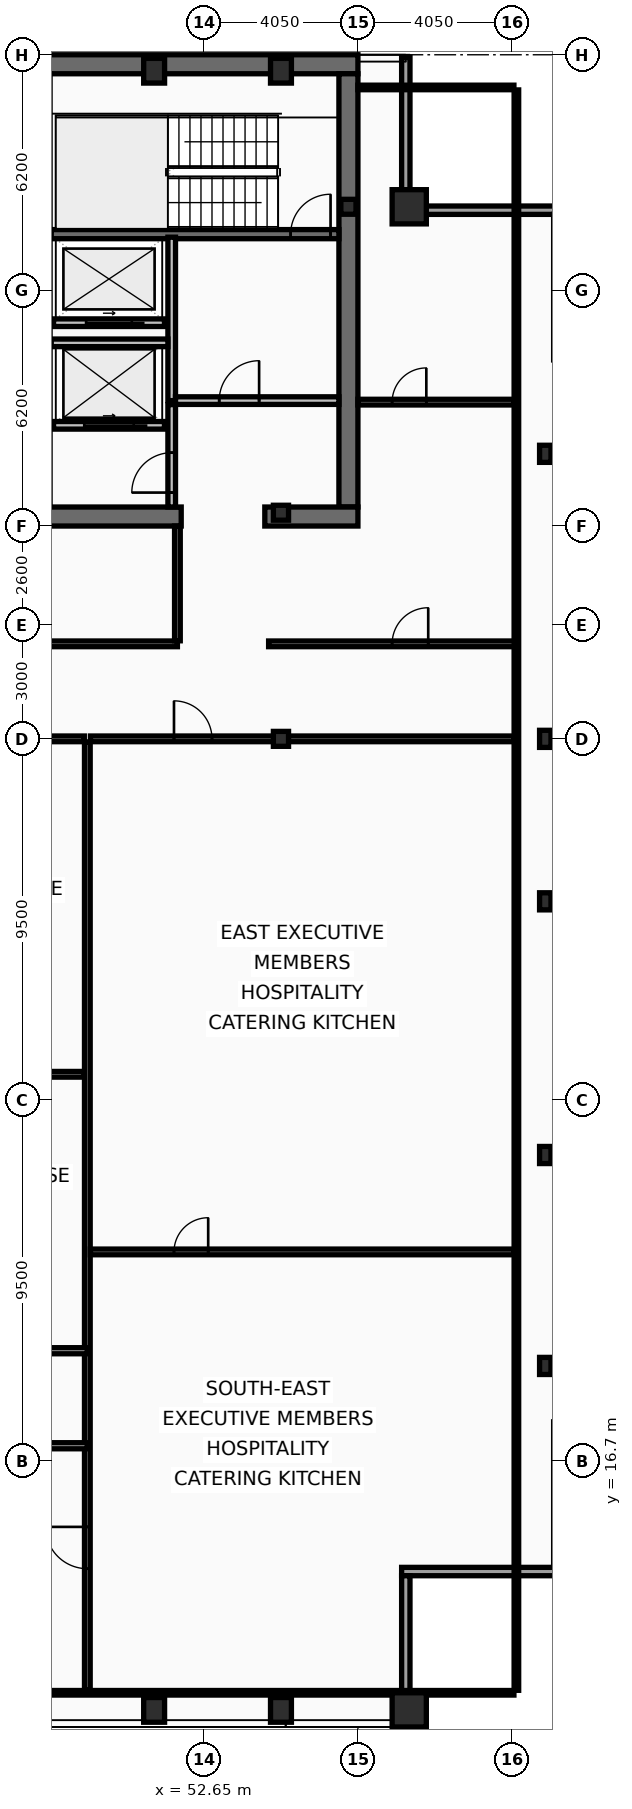
"""IFC4 building model, lengths in metres.
Left out: names, types, materials, properties, quantities, classifications, styles, units other than length and angle.
Written with IfcOpenShell. Run it as: python <this file> out.ifc"""

import sys

from ifc_helpers import new_model, si_unit, direction, frame, frame_2d, origin, origin_2d, place, context, subcontext, project, spatial, rectangle, hollow_rectangle, i_section, extrude, element, fill, save


model = new_model("IFC4")
c1 = context("Model", 3, precision=1e-05, world=origin(), true_north=direction((0.0, 1.0)))
c2 = subcontext(c1, "Body", "Model", "MODEL_VIEW")
j1 = project(units=[si_unit("LENGTHUNIT", "METRE"), si_unit("PLANEANGLEUNIT", "RADIAN")], contexts=[c1])
p1 = place(None, origin())
s1 = spatial("IfcSite", under=j1, at=p1, CompositionType="ELEMENT")
p2 = place(p1, origin())
s2 = spatial("IfcBuilding", under=s1, at=p2, CompositionType="ELEMENT")
p3 = place(p2, frame((0.0, 0.0, 318.2)))
s3 = spatial("IfcBuildingStorey", under=s2, at=p3, CompositionType="ELEMENT", Elevation=318.2)
p4 = place(p3, frame((16.2, 53.45, 0.0), z_axis=(0.0, 0.0, 1.0), x_axis=(1.0, 0.0, 0.0)))
e1 = element("IfcWall", 1, at=p4, inside=s3, PredefinedType="SHEAR", context=c2, shape_type="SweptSolid", body=[
    extrude(rectangle(XDim=40.5, YDim=0.5, at=frame_2d((20.25, 0.0))), origin(), (0.0, 0.0, 1.0), 3.44),
])
p5 = place(p3, frame((56.45, 53.2, 0.0), z_axis=(0.0, 0.0, 1.0), x_axis=(0.0, -1.0, 0.0)))
e2 = element("IfcWall", 2, at=p5, inside=s3, PredefinedType="SHEAR", context=c2, shape_type="SweptSolid", body=[
    extrude(rectangle(XDim=11.4, YDim=0.5, at=frame_2d((5.7, 0.0))), origin(), (0.0, 0.0, 1.0), 3.44),
])
p6 = place(p3, frame((52.05, 41.55, 0.0), z_axis=(0.0, 0.0, 1.0), x_axis=(-1.0, 0.0, 0.0)))
e3 = element("IfcWall", 3, at=p6, inside=s3, PredefinedType="SHEAR", context=c2, shape_type="SweptSolid", body=[
    extrude(rectangle(XDim=11.3, YDim=0.5, at=frame_2d((5.65, 0.0))), origin(), (0.0, 0.0, 1.0), 3.44),
])
p7 = place(p3, frame((56.7, 41.55, 0.0), z_axis=(0.0, 0.0, 1.0), x_axis=(-1.0, 0.0, 0.0)))
e4 = element("IfcWall", 4, at=p7, inside=s3, PredefinedType="SHEAR", context=c2, shape_type="SweptSolid", body=[
    extrude(rectangle(XDim=2.45, YDim=0.5, at=frame_2d((1.225, 0.0))), origin(), (0.0, 0.0, 1.0), 3.44),
])
p8 = place(p3, frame((48.63, 48.98, 0.0), z_axis=(0.0, 0.0, 1.0), x_axis=(1.0, 0.0, 0.0)))
e5 = element("IfcWall", 5, at=p8, inside=s3, PredefinedType="SHEAR", context=c2, shape_type="SweptSolid", body=[
    extrude(rectangle(XDim=7.57, YDim=0.24, at=frame_2d((3.785, 0.0))), origin(), (0.0, 0.0, 1.0), 3.44),
])
p9 = place(p8, frame((6.3, 0.0, 0.0)))
e6 = element("IfcOpeningElement", 6, at=p9, cuts=e5, PredefinedType="OPENING", context=c2, shape_type="SweptSolid", body=[
    extrude(rectangle(XDim=1.05, YDim=2.15, at=frame_2d((0.525, 1.075))), frame((0.0, 0.13, 0.0), z_axis=(0.0, -1.0, 0.0), x_axis=(1.0, 0.0, 0.0)), (0.0, 0.0, 1.0), 0.26),
])
for number, where, z_axis, x_axis in (
    (7, (58.05, 10.15, 0.0), (0.0, 0.0, 1.0), (1.0, 0.0, 0.0)),
    (8, (58.05, 49.7, 0.0), (0.0, 0.0, 1.0), (1.0, 0.0, 0.0)),
):
    element("IfcColumn", number, at=place(p3, frame(where, z_axis=z_axis, x_axis=x_axis)), inside=s3, PredefinedType="COLUMN", context=c2, shape_type="SweptSolid", body=[
        extrude(hollow_rectangle(XDim=0.9, YDim=0.9, WallThickness=0.05, at=origin_2d()), origin(), (0.0, 0.0, 1.0), 3.6),
    ])
for number, where, z_axis, x_axis in (
    (9, (51.337, 10.15, 0.0), (0.0, 0.0, 1.0), (1.0, 0.0, 0.0)),
    (10, (54.675, 10.15, 0.0), (0.0, 0.0, 1.0), (1.0, 0.0, 0.0)),
    (11, (51.337, 53.28, 0.0), (0.0, 0.0, 1.0), (1.0, 0.0, 0.0)),
    (12, (54.675, 53.28, 0.0), (0.0, 0.0, 1.0), (1.0, 0.0, 0.0)),
):
    element("IfcColumn", number, at=place(p3, frame(where, z_axis=z_axis, x_axis=x_axis)), inside=s3, PredefinedType="COLUMN", context=c2, shape_type="SweptSolid", body=[
        extrude(hollow_rectangle(XDim=0.55, YDim=0.65, WallThickness=0.04, at=origin_2d()), origin(), (0.0, 0.0, 1.0), 3.6),
    ])
for number, where, z_axis, x_axis in (
    (13, (61.63, 19.2, 0.0), (0.0, 0.0, 1.0), (1.0, 0.0, 0.0)),
    (14, (61.63, 24.75, 0.0), (0.0, 0.0, 1.0), (1.0, 0.0, 0.0)),
    (15, (61.63, 31.425, 0.0), (0.0, 0.0, 1.0), (1.0, 0.0, 0.0)),
    (16, (61.63, 35.7, 0.0), (0.0, 0.0, 1.0), (1.0, 0.0, 0.0)),
    (17, (61.63, 43.2, 0.0), (0.0, 0.0, 1.0), (1.0, 0.0, 0.0)),
):
    element("IfcColumn", number, at=place(p3, frame(where, z_axis=z_axis, x_axis=x_axis)), inside=s3, PredefinedType="COLUMN", context=c2, shape_type="SweptSolid", body=[
        extrude(i_section(OverallWidth=0.3, OverallDepth=0.45, WebThickness=0.014, FlangeThickness=0.026, at=origin_2d()), origin(), (0.0, 0.0, 1.0), 3.6),
    ])
for number, where, z_axis, x_axis in (
    (18, (56.45, 49.7, 0.0), (0.0, 0.0, 1.0), (1.0, 0.0, 0.0)),
    (19, (54.675, 35.7, 0.0), (0.0, 0.0, 1.0), (1.0, 0.0, 0.0)),
    (20, (54.675, 41.65, 0.0), (0.0, 0.0, 1.0), (1.0, 0.0, 0.0)),
):
    element("IfcColumn", number, at=place(p3, frame(where, z_axis=z_axis, x_axis=x_axis)), inside=s3, PredefinedType="COLUMN", context=c2, shape_type="SweptSolid", body=[
        extrude(i_section(OverallWidth=0.399, OverallDepth=0.393, WebThickness=0.023, FlangeThickness=0.037, at=origin_2d()), origin(), (0.0, 0.0, 1.0), 3.6),
    ])
p10 = place(p3, frame((57.96, 53.63, 0.0), z_axis=(0.0, 0.0, 1.0), x_axis=(0.0, -1.0, 0.0)))
e21 = element("IfcWall", 21, at=p10, inside=s3, PredefinedType="SOLIDWALL", context=c2, shape_type="SweptSolid", body=[
    extrude(rectangle(XDim=3.91, YDim=0.22, at=frame_2d((1.955, 0.0))), origin(), (0.0, 0.0, 1.0), 2.88),
])
for number, where, z_axis, x_axis in (
    (22, (57.85, 49.61, 0.0), (0.0, 0.0, 1.0), (1.0, 0.0, 0.0)),
    (23, (62.07, 13.79, 0.0), (0.0, 0.0, 1.0), (-1.0, 0.0, 0.0)),
):
    element("IfcWall", number, at=place(p3, frame(where, z_axis=z_axis, x_axis=x_axis)), inside=s3, PredefinedType="SOLIDWALL", context=c2, shape_type="SweptSolid", body=[
        extrude(rectangle(XDim=4.22, YDim=0.22, at=frame_2d((2.11, 0.0))), origin(), (0.0, 0.0, 1.0), 2.88),
    ])
p11 = place(p3, frame((57.96, 13.68, 0.0), z_axis=(0.0, 0.0, 1.0), x_axis=(0.0, -1.0, 0.0)))
e24 = element("IfcWall", 24, at=p11, inside=s3, PredefinedType="SOLIDWALL", context=c2, shape_type="SweptSolid", body=[
    extrude(rectangle(XDim=3.91, YDim=0.22, at=frame_2d((1.955, 0.0))), origin(), (0.0, 0.0, 1.0), 2.88),
])
p12 = place(p3, frame((51.61, 43.95, 0.0), z_axis=(0.0, 0.0, 1.0), x_axis=(-1.0, 0.0, 0.0)))
e25 = element("IfcWall", 25, at=p12, inside=s3, PredefinedType="PARTITIONING", context=c2, shape_type="SweptSolid", body=[
    extrude(rectangle(XDim=2.92, YDim=0.2, at=frame_2d((1.46, 0.0))), origin(), (0.0, 0.0, 1.0), 3.44),
])
p13 = place(p12, frame((0.81, 0.0, 0.0)))
e26 = element("IfcOpeningElement", 26, at=p13, cuts=e25, PredefinedType="OPENING", context=c2, shape_type="SweptSolid", body=[
    extrude(rectangle(XDim=1.3, YDim=2.18, at=frame_2d((0.65, 1.09))), frame((0.0, 0.11, 0.0), z_axis=(0.0, -1.0, 0.0), x_axis=(1.0, 0.0, 0.0)), (0.0, 0.0, 1.0), 0.22),
])
p14 = place(p3, frame((51.61, 46.65, 0.0), z_axis=(0.0, 0.0, 1.0), x_axis=(-1.0, 0.0, 0.0)))
e27 = element("IfcWall", 27, at=p14, inside=s3, PredefinedType="PARTITIONING", context=c2, shape_type="SweptSolid", body=[
    extrude(rectangle(XDim=2.92, YDim=0.2, at=frame_2d((1.46, 0.0))), origin(), (0.0, 0.0, 1.0), 3.44),
])
p15 = place(p14, frame((0.86, 0.0, 0.0)))
e28 = element("IfcOpeningElement", 28, at=p15, cuts=e27, PredefinedType="OPENING", context=c2, shape_type="SweptSolid", body=[
    extrude(rectangle(XDim=1.2, YDim=2.18, at=frame_2d((0.6, 1.09))), frame((0.0, 0.11, 0.0), z_axis=(0.0, -1.0, 0.0), x_axis=(1.0, 0.0, 0.0)), (0.0, 0.0, 1.0), 0.22),
])
p16 = place(p3, frame((51.8, 44.6, 0.0), z_axis=(0.0, 0.0, 1.0), x_axis=(0.0, 1.0, 0.0)))
e29 = element("IfcWall", 29, at=p16, inside=s3, PredefinedType="PARTITIONING", context=c2, shape_type="SweptSolid", body=[
    extrude(rectangle(XDim=4.3, YDim=0.2, at=frame_2d((2.15, 0.0))), origin(), (0.0, 0.0, 1.0), 3.44),
])
p17 = place(p3, frame((51.9, 44.6, 0.0), z_axis=(0.0, 0.0, 1.0), x_axis=(1.0, 0.0, 0.0)))
e30 = element("IfcWall", 30, at=p17, inside=s3, PredefinedType="PARTITIONING", context=c2, shape_type="SweptSolid", body=[
    extrude(rectangle(XDim=4.3, YDim=0.2, at=frame_2d((2.15, 0.0))), origin(), (0.0, 0.0, 1.0), 3.44),
])
p18 = place(p17, frame((1.15, 0.0, 0.0)))
e31 = element("IfcOpeningElement", 31, at=p18, cuts=e30, PredefinedType="OPENING", context=c2, shape_type="SweptSolid", body=[
    extrude(rectangle(XDim=1.05, YDim=2.15, at=frame_2d((0.525, 1.075))), frame((0.0, 0.11, 0.0), z_axis=(0.0, -1.0, 0.0), x_axis=(1.0, 0.0, 0.0)), (0.0, 0.0, 1.0), 0.22),
])
p19 = place(p3, frame((48.63, 46.12, 0.0), z_axis=(0.0, 0.0, 1.0), x_axis=(1.0, 0.0, 0.0)))
e32 = element("IfcWall", 32, at=p19, inside=s3, PredefinedType="PARTITIONING", context=c2, shape_type="SweptSolid", body=[
    extrude(rectangle(XDim=3.07, YDim=0.2, at=frame_2d((1.535, 0.0))), origin(), (0.0, 0.0, 1.0), 3.44),
])
p20 = place(p3, frame((51.8, 41.8, 0.0), z_axis=(0.0, 0.0, 1.0), x_axis=(0.0, 1.0, 0.0)))
e33 = element("IfcWall", 33, at=p20, inside=s3, PredefinedType="PARTITIONING", context=c2, shape_type="SweptSolid", body=[
    extrude(rectangle(XDim=2.695, YDim=0.2, at=frame_2d((1.348, 0.0))), origin(), (0.0, 0.0, 1.0), 3.44),
])
p21 = place(p20, frame((0.38, 0.0, 0.0)))
e34 = element("IfcOpeningElement", 34, at=p21, cuts=e33, PredefinedType="OPENING", context=c2, shape_type="SweptSolid", body=[
    extrude(rectangle(XDim=1.05, YDim=2.15, at=frame_2d((0.525, 1.075))), frame((0.0, 0.11, 0.0), z_axis=(0.0, -1.0, 0.0), x_axis=(1.0, 0.0, 0.0)), (0.0, 0.0, 1.0), 0.22),
])
p22 = place(p3, frame((46.3, 38.2, 0.0), z_axis=(0.0, 0.0, 1.0), x_axis=(1.0, 0.0, 0.0)))
e35 = element("IfcWall", 35, at=p22, inside=s3, PredefinedType="PARTITIONING", context=c2, shape_type="SweptSolid", body=[
    extrude(rectangle(XDim=5.65, YDim=0.15, at=frame_2d((2.825, 0.0))), origin(), (0.0, 0.0, 1.0), 2.83),
])
p23 = place(p22, frame((1.1, 0.0, 0.0)))
e36 = element("IfcOpeningElement", 36, at=p23, cuts=e35, PredefinedType="OPENING", context=c2, shape_type="SweptSolid", body=[
    extrude(rectangle(XDim=1.0, YDim=2.05, at=frame_2d((0.5, 1.025))), frame((0.0, 0.085, 0.0), z_axis=(0.0, -1.0, 0.0), x_axis=(1.0, 0.0, 0.0)), (0.0, 0.0, 1.0), 0.17),
])
p24 = place(p3, frame((51.95, 38.28, 0.0), z_axis=(0.0, 0.0, 1.0), x_axis=(0.0, 1.0, 0.0)))
e37 = element("IfcWall", 37, at=p24, inside=s3, PredefinedType="PARTITIONING", context=c2, shape_type="SweptSolid", body=[
    extrude(rectangle(XDim=3.02, YDim=0.15, at=frame_2d((1.51, 0.0))), origin(), (0.0, 0.0, 1.0), 3.44),
])
p25 = place(p3, frame((54.35, 38.2, 0.0), z_axis=(0.0, 0.0, 1.0), x_axis=(1.0, 0.0, 0.0)))
e38 = element("IfcWall", 38, at=p25, inside=s3, PredefinedType="PARTITIONING", context=c2, shape_type="SweptSolid", body=[
    extrude(rectangle(XDim=6.52, YDim=0.15, at=frame_2d((3.26, 0.0))), origin(), (0.0, 0.0, 1.0), 2.83),
])
p26 = place(p25, frame((3.25, 0.0, 0.0)))
e39 = element("IfcOpeningElement", 39, at=p26, cuts=e38, PredefinedType="OPENING", context=c2, shape_type="SweptSolid", body=[
    extrude(rectangle(XDim=0.95, YDim=2.05, at=frame_2d((0.475, 1.025))), frame((0.0, 0.085, 0.0), z_axis=(0.0, -1.0, 0.0), x_axis=(1.0, 0.0, 0.0)), (0.0, 0.0, 1.0), 0.17),
])
p27 = place(p3, frame((56.7, 44.56, 0.0), z_axis=(0.0, 0.0, 1.0), x_axis=(1.0, 0.0, 0.0)))
e40 = element("IfcWall", 40, at=p27, inside=s3, PredefinedType="PARTITIONING", context=c2, shape_type="SweptSolid", body=[
    extrude(rectangle(XDim=4.105, YDim=0.15, at=frame_2d((2.052, 0.0))), origin(), (0.0, 0.0, 1.0), 2.88),
])
p28 = place(p27, frame((0.9, 0.0, 0.0)))
e41 = element("IfcOpeningElement", 41, at=p28, cuts=e40, PredefinedType="OPENING", context=c2, shape_type="SweptSolid", body=[
    extrude(rectangle(XDim=0.9, YDim=2.05, at=frame_2d((0.45, 1.025))), frame((0.0, 0.085, 0.0), z_axis=(0.0, -1.0, 0.0), x_axis=(1.0, 0.0, 0.0)), (0.0, 0.0, 1.0), 0.17),
])
p29 = place(p3, frame((49.58, 10.665, 0.0), z_axis=(0.0, 0.0, 1.0), x_axis=(0.0, 1.0, 0.0)))
e42 = element("IfcWall", 42, at=p29, inside=s3, PredefinedType="PARTITIONING", context=c2, shape_type="SweptSolid", body=[
    extrude(rectangle(XDim=24.955, YDim=0.15, at=frame_2d((12.478, 0.0))), origin(), (0.0, 0.0, 1.0), 3.07),
])
p30 = place(p29, frame((3.2, 0.0, 0.0)))
e43 = element("IfcOpeningElement", 43, at=p30, cuts=e42, PredefinedType="OPENING", context=c2, shape_type="SweptSolid", body=[
    extrude(rectangle(XDim=1.1, YDim=2.1, at=frame_2d((0.55, 1.05))), frame((0.0, 0.085, 0.0), z_axis=(0.0, -1.0, 0.0), x_axis=(1.0, 0.0, 0.0)), (0.0, 0.0, 1.0), 0.17),
])
p31 = place(p3, frame((24.48, 35.7, 0.0), z_axis=(0.0, 0.0, 1.0), x_axis=(1.0, 0.0, 0.0)))
e44 = element("IfcWall", 44, at=p31, inside=s3, PredefinedType="PARTITIONING", context=c2, shape_type="SweptSolid", body=[
    extrude(rectangle(XDim=25.02, YDim=0.15, at=frame_2d((12.51, 0.0))), origin(), (0.0, 0.0, 1.0), 2.83),
])
p32 = place(p3, frame((49.66, 35.7, 0.0), z_axis=(0.0, 0.0, 1.0), x_axis=(1.0, 0.0, 0.0)))
e45 = element("IfcWall", 45, at=p32, inside=s3, PredefinedType="PARTITIONING", context=c2, shape_type="SweptSolid", body=[
    extrude(rectangle(XDim=11.145, YDim=0.15, at=frame_2d((5.573, 0.0))), origin(), (0.0, 0.0, 1.0), 2.83),
])
p33 = place(p32, frame((2.2, 0.0, 0.0)))
e46 = element("IfcOpeningElement", 46, at=p33, cuts=e45, PredefinedType="OPENING", context=c2, shape_type="SweptSolid", body=[
    extrude(rectangle(XDim=1.0, YDim=2.05, at=frame_2d((0.5, 1.025))), frame((0.0, 0.085, 0.0), z_axis=(0.0, -1.0, 0.0), x_axis=(1.0, 0.0, 0.0)), (0.0, 0.0, 1.0), 0.17),
])
p34 = place(p3, frame((49.66, 22.2, 0.0), z_axis=(0.0, 0.0, 1.0), x_axis=(1.0, 0.0, 0.0)))
e47 = element("IfcWall", 47, at=p34, inside=s3, PredefinedType="PARTITIONING", context=c2, shape_type="SweptSolid", body=[
    extrude(rectangle(XDim=11.145, YDim=0.15, at=frame_2d((5.573, 0.0))), origin(), (0.0, 0.0, 1.0), 2.83),
])
p35 = place(p34, frame((2.2, 0.0, 0.0)))
e48 = element("IfcOpeningElement", 48, at=p35, cuts=e47, PredefinedType="OPENING", context=c2, shape_type="SweptSolid", body=[
    extrude(rectangle(XDim=0.9, YDim=2.05, at=frame_2d((0.45, 1.025))), frame((0.0, 0.085, 0.0), z_axis=(0.0, -1.0, 0.0), x_axis=(1.0, 0.0, 0.0)), (0.0, 0.0, 1.0), 0.17),
])
p36 = place(p3, frame((42.65, 19.6, 0.0), z_axis=(0.0, 0.0, 1.0), x_axis=(1.0, 0.0, 0.0)))
e49 = element("IfcWall", 49, at=p36, inside=s3, PredefinedType="PARTITIONING", context=c2, shape_type="SweptSolid", body=[
    extrude(rectangle(XDim=6.93, YDim=0.16, at=frame_2d((3.465, 0.0))), origin(), (0.0, 0.0, 1.0), 2.83),
])
p37 = place(p36, frame((3.161, 0.0, 0.0)))
e50 = element("IfcOpeningElement", 50, at=p37, cuts=e49, PredefinedType="OPENING", context=c2, shape_type="SweptSolid", body=[
    extrude(rectangle(XDim=1.0, YDim=2.05, at=frame_2d((0.5, 1.025))), frame((0.0, 0.09, 0.0), z_axis=(0.0, -1.0, 0.0), x_axis=(1.0, 0.0, 0.0)), (0.0, 0.0, 1.0), 0.18),
])
p38 = place(p3, frame((42.73, 26.874, 0.0), z_axis=(0.0, 0.0, 1.0), x_axis=(1.0, 0.0, 0.0)))
e51 = element("IfcWall", 51, at=p38, inside=s3, PredefinedType="PARTITIONING", context=c2, shape_type="SweptSolid", body=[
    extrude(rectangle(XDim=6.77, YDim=0.15, at=frame_2d((3.385, 0.0))), origin(), (0.0, 0.0, 1.0), 2.83),
])
p39 = place(p38, frame((3.119, 0.0, 0.0)))
e52 = element("IfcOpeningElement", 52, at=p39, cuts=e51, PredefinedType="OPENING", context=c2, shape_type="SweptSolid", body=[
    extrude(rectangle(XDim=0.9, YDim=2.05, at=frame_2d((0.45, 1.025))), frame((0.0, 0.085, 0.0), z_axis=(0.0, -1.0, 0.0), x_axis=(1.0, 0.0, 0.0)), (0.0, 0.0, 1.0), 0.17),
])
p40 = place(p3, frame((40.32, 17.1, 0.0), z_axis=(0.0, 0.0, 1.0), x_axis=(1.0, 0.0, 0.0)))
e53 = element("IfcWall", 53, at=p40, inside=s3, PredefinedType="PARTITIONING", context=c2, shape_type="SweptSolid", body=[
    extrude(rectangle(XDim=9.26, YDim=0.16, at=frame_2d((4.63, 0.0))), origin(), (0.0, 0.0, 1.0), 2.83),
])
p41 = place(p40, frame((4.139, 0.0, 0.0)))
e54 = element("IfcOpeningElement", 54, at=p41, cuts=e53, PredefinedType="OPENING", context=c2, shape_type="SweptSolid", body=[
    extrude(rectangle(XDim=1.0, YDim=2.05, at=frame_2d((0.5, 1.025))), frame((0.0, 0.09, 0.0), z_axis=(0.0, -1.0, 0.0), x_axis=(1.0, 0.0, 0.0)), (0.0, 0.0, 1.0), 0.18),
])
p42 = place(p3, frame((60.87, 10.665, 0.0), z_axis=(0.0, 0.0, 1.0), x_axis=(0.0, 1.0, 0.0)))
e55 = element("IfcWall", 55, at=p42, inside=s3, PredefinedType="PARTITIONING", context=c2, shape_type="SweptSolid", body=[
    extrude(rectangle(XDim=42.11, YDim=0.12, at=frame_2d((21.055, 0.0))), origin(), (0.0, 0.0, 1.0), 2.83),
])
p43 = place(p3, frame((56.7, 52.84, 0.0), z_axis=(0.0, 0.0, 1.0), x_axis=(1.0, 0.0, 0.0)))
e56 = element("IfcWall", 56, at=p43, inside=s3, PredefinedType="PARTITIONING", context=c2, shape_type="SweptSolid", body=[
    extrude(rectangle(XDim=4.105, YDim=0.12, at=frame_2d((2.052, 0.0))), origin(), (0.0, 0.0, 1.0), 3.44),
])
p44 = place(p3, frame((12.095, 10.6, 0.0), z_axis=(0.0, 0.0, 1.0), x_axis=(1.0, 0.0, 0.0)))
e57 = element("IfcWall", 57, at=p44, inside=s3, PredefinedType="PARTITIONING", context=c2, shape_type="SweptSolid", body=[
    extrude(rectangle(XDim=48.71, YDim=0.12, at=frame_2d((24.355, 0.0))), origin(), (0.0, 0.0, 1.0), 2.83),
])
p45 = place(p9, origin())
e58 = element("IfcDoor", 58, at=p45, inside=s3, OperationType="SINGLE_SWING_RIGHT", PredefinedType="DOOR", context=c2, shape_type="SweptSolid", body=[
    extrude(rectangle(XDim=1.05, YDim=2.15, at=frame_2d((0.525, 1.075))), frame((0.0, 0.025, 0.0), z_axis=(0.0, -1.0, 0.0), x_axis=(1.0, 0.0, 0.0)), (0.0, 0.0, 1.0), 0.05),
])
fill(e6, e58)
p46 = place(p13, origin())
e59 = element("IfcDoor", 59, at=p46, inside=s3, OperationType="SLIDING_TO_LEFT", PredefinedType="DOOR", context=c2, shape_type="SweptSolid", body=[
    extrude(rectangle(XDim=1.3, YDim=2.18, at=frame_2d((0.65, 1.09))), frame((0.0, 0.025, 0.0), z_axis=(0.0, -1.0, 0.0), x_axis=(1.0, 0.0, 0.0)), (0.0, 0.0, 1.0), 0.05),
])
fill(e26, e59)
p47 = place(p15, origin())
e60 = element("IfcDoor", 60, at=p47, inside=s3, OperationType="SLIDING_TO_LEFT", PredefinedType="DOOR", context=c2, shape_type="SweptSolid", body=[
    extrude(rectangle(XDim=1.2, YDim=2.18, at=frame_2d((0.6, 1.09))), frame((0.0, 0.025, 0.0), z_axis=(0.0, -1.0, 0.0), x_axis=(1.0, 0.0, 0.0)), (0.0, 0.0, 1.0), 0.05),
])
fill(e28, e60)
p48 = place(p18, origin())
e61 = element("IfcDoor", 61, at=p48, inside=s3, OperationType="SINGLE_SWING_RIGHT", PredefinedType="DOOR", context=c2, shape_type="SweptSolid", body=[
    extrude(rectangle(XDim=1.05, YDim=2.15, at=frame_2d((0.525, 1.075))), frame((0.0, 0.025, 0.0), z_axis=(0.0, -1.0, 0.0), x_axis=(1.0, 0.0, 0.0)), (0.0, 0.0, 1.0), 0.05),
])
fill(e31, e61)
p49 = place(p21, origin())
e62 = element("IfcDoor", 62, at=p49, inside=s3, OperationType="SINGLE_SWING_LEFT", PredefinedType="DOOR", context=c2, shape_type="SweptSolid", body=[
    extrude(rectangle(XDim=1.05, YDim=2.15, at=frame_2d((0.525, 1.075))), frame((0.0, 0.025, 0.0), z_axis=(0.0, -1.0, 0.0), x_axis=(1.0, 0.0, 0.0)), (0.0, 0.0, 1.0), 0.05),
])
fill(e34, e62)
p50 = place(p26, origin())
e63 = element("IfcDoor", 63, at=p50, inside=s3, OperationType="SINGLE_SWING_RIGHT", PredefinedType="DOOR", context=c2, shape_type="SweptSolid", body=[
    extrude(rectangle(XDim=0.95, YDim=2.05, at=frame_2d((0.475, 1.025))), frame((0.0, 0.025, 0.0), z_axis=(0.0, -1.0, 0.0), x_axis=(1.0, 0.0, 0.0)), (0.0, 0.0, 1.0), 0.05),
])
fill(e39, e63)
p51 = place(p28, origin())
e64 = element("IfcDoor", 64, at=p51, inside=s3, OperationType="SINGLE_SWING_RIGHT", PredefinedType="DOOR", context=c2, shape_type="SweptSolid", body=[
    extrude(rectangle(XDim=0.9, YDim=2.05, at=frame_2d((0.45, 1.025))), frame((0.0, 0.025, 0.0), z_axis=(0.0, -1.0, 0.0), x_axis=(1.0, 0.0, 0.0)), (0.0, 0.0, 1.0), 0.05),
])
fill(e41, e64)
p52 = place(p30, origin())
e65 = element("IfcDoor", 65, at=p52, inside=s3, OperationType="SINGLE_SWING_RIGHT", PredefinedType="DOOR", context=c2, shape_type="SweptSolid", body=[
    extrude(rectangle(XDim=1.1, YDim=2.1, at=frame_2d((0.55, 1.05))), frame((0.0, 0.025, 0.0), z_axis=(0.0, -1.0, 0.0), x_axis=(1.0, 0.0, 0.0)), (0.0, 0.0, 1.0), 0.05),
])
fill(e43, e65)
p53 = place(p33, origin())
e66 = element("IfcDoor", 66, at=p53, inside=s3, OperationType="SINGLE_SWING_LEFT", PredefinedType="DOOR", context=c2, shape_type="SweptSolid", body=[
    extrude(rectangle(XDim=1.0, YDim=2.05, at=frame_2d((0.5, 1.025))), frame((0.0, 0.025, 0.0), z_axis=(0.0, -1.0, 0.0), x_axis=(1.0, 0.0, 0.0)), (0.0, 0.0, 1.0), 0.05),
])
fill(e46, e66)
p54 = place(p35, origin())
e67 = element("IfcDoor", 67, at=p54, inside=s3, OperationType="SINGLE_SWING_RIGHT", PredefinedType="DOOR", context=c2, shape_type="SweptSolid", body=[
    extrude(rectangle(XDim=0.9, YDim=2.05, at=frame_2d((0.45, 1.025))), frame((0.0, 0.025, 0.0), z_axis=(0.0, -1.0, 0.0), x_axis=(1.0, 0.0, 0.0)), (0.0, 0.0, 1.0), 0.05),
])
fill(e48, e67)
save(model, sys.argv[1])
